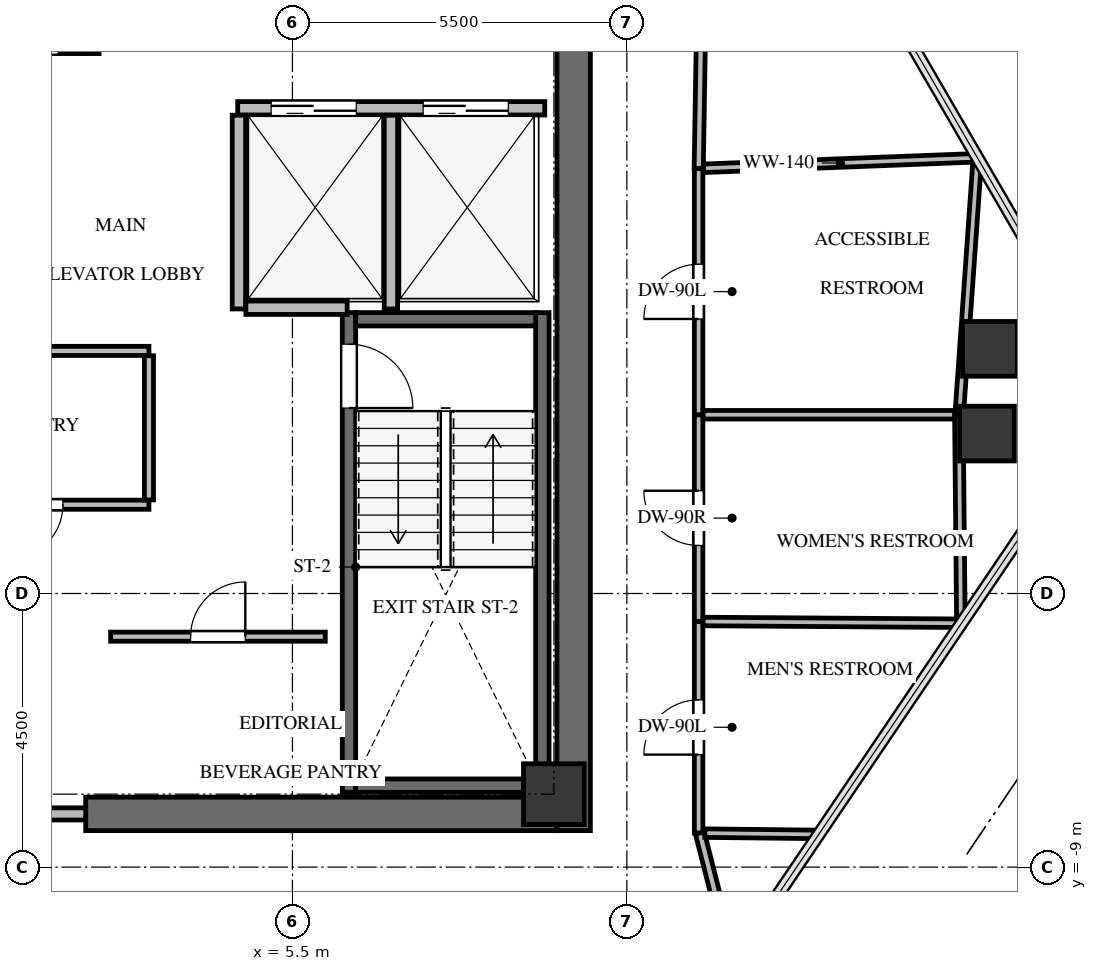
"""IFC4 building model, lengths in metres.
Left out: names, types, materials, properties, quantities, classifications, styles, units other than length and angle.
Written with IfcOpenShell. Run it as: python <this file> out.ifc"""

import sys

from ifc_helpers import new_model, si_unit, direction, frame, frame_2d, origin, origin_2d, place, context, subcontext, project, spatial, rectangle, extrude, source, transform, mapped, element, fill, save


model = new_model("IFC4")
c1 = context("Model", 3, precision=1e-05, world=origin(), true_north=direction((0.0, 1.0)))
c2 = subcontext(c1, "Body", "Model", "MODEL_VIEW")
j1 = project(units=[si_unit("LENGTHUNIT", "METRE"), si_unit("PLANEANGLEUNIT", "RADIAN")], contexts=[c1])
p1 = place(None, origin())
s1 = spatial("IfcSite", under=j1, at=p1, CompositionType="ELEMENT")
p2 = place(p1, origin())
s2 = spatial("IfcBuilding", under=s1, at=p2, CompositionType="ELEMENT")
p3 = place(p2, frame((0.0, 0.0, 254.7)))
s3 = spatial("IfcBuildingStorey", under=s2, at=p3, CompositionType="ELEMENT", Elevation=254.7)
p4 = place(p3, frame((10.125, -8.4, 0.0), z_axis=(0.0, 0.0, 1.0), x_axis=(0.0, 1.0, 0.0)))
e1 = element("IfcWall", 1, at=p4, inside=s3, PredefinedType="SHEAR", context=c2, shape_type="SweptSolid", body=[
    extrude(rectangle(XDim=16.8, YDim=0.55, at=frame_2d((8.4, 0.0))), origin(), (0.0, 0.0, 1.0), 3.4),
])
p5 = place(p3, frame((2.1, -8.125, 0.0), z_axis=(0.0, 0.0, 1.0), x_axis=(1.0, 0.0, 0.0)))
e2 = element("IfcWall", 2, at=p5, inside=s3, PredefinedType="SHEAR", context=c2, shape_type="SweptSolid", body=[
    extrude(rectangle(XDim=7.75, YDim=0.55, at=frame_2d((3.875, 0.0))), origin(), (0.0, 0.0, 1.0), 3.4),
])
p6 = place(p3, frame((9.61, -7.77, -0.24), z_axis=(0.0, 0.0, 1.0), x_axis=(0.0, 1.0, 0.0)))
e3 = element("IfcWall", 3, at=p6, inside=s3, PredefinedType="SHEAR", context=c2, shape_type="SweptSolid", body=[
    extrude(rectangle(XDim=7.89, YDim=0.22, at=frame_2d((3.945, 0.0))), origin(), (0.0, 0.0, 1.0), 3.4),
])
p7 = place(p3, frame((6.43, 0.12, -0.24), z_axis=(0.0, 0.0, 1.0), x_axis=(0.0, -1.0, 0.0)))
e4 = element("IfcWall", 4, at=p7, inside=s3, PredefinedType="SHEAR", context=c2, shape_type="SweptSolid", body=[
    extrude(rectangle(XDim=7.89, YDim=0.22, at=frame_2d((3.945, 0.0))), origin(), (0.0, 0.0, 1.0), 3.4),
])
p8 = place(p7, frame((0.52, 0.0, 0.0)))
e5 = element("IfcOpeningElement", 5, at=p8, cuts=e4, PredefinedType="OPENING", context=c2, shape_type="SweptSolid", body=[
    extrude(rectangle(XDim=1.05, YDim=2.15, at=frame_2d((0.525, 1.075))), frame((0.0, 0.12, 0.0), z_axis=(0.0, -1.0, 0.0), x_axis=(1.0, 0.0, 0.0)), (0.0, 0.0, 1.0), 0.24),
])
for number, where, z_axis, x_axis in (
    (6, (6.54, -7.66, -0.24), (0.0, 0.0, 1.0), (1.0, 0.0, 0.0)),
    (7, (9.5, 0.01, -0.24), (0.0, 0.0, 1.0), (-1.0, 0.0, 0.0)),
):
    element("IfcWall", number, at=place(p3, frame(where, z_axis=z_axis, x_axis=x_axis)), inside=s3, PredefinedType="SHEAR", context=c2, shape_type="SweptSolid", body=[
        extrude(rectangle(XDim=2.96, YDim=0.22, at=frame_2d((1.48, 0.0))), origin(), (0.0, 0.0, 1.0), 3.4),
    ])
p9 = place(p3, frame((2.21, 4.38, -0.24), z_axis=(0.0, 0.0, 1.0), x_axis=(0.0, 1.0, 0.0)))
e8 = element("IfcWall", 8, at=p9, inside=s3, PredefinedType="SHEAR", context=c2, shape_type="SweptSolid", body=[
    extrude(rectangle(XDim=3.4, YDim=0.22, at=frame_2d((1.7, 0.0))), origin(), (0.0, 0.0, 1.0), 3.4),
])
p10 = place(p3, frame((-5.25, 4.49, -0.24), z_axis=(0.0, 0.0, 1.0), x_axis=(1.0, 0.0, 0.0)))
e9 = element("IfcWall", 9, at=p10, inside=s3, PredefinedType="SHEAR", context=c2, shape_type="SweptSolid", body=[
    extrude(rectangle(XDim=7.35, YDim=0.22, at=frame_2d((3.675, 0.0))), origin(), (0.0, 0.0, 1.0), 3.4),
])
p11 = place(p10, frame((5.85, 0.0, 0.0)))
e10 = element("IfcOpeningElement", 10, at=p11, cuts=e9, PredefinedType="OPENING", context=c2, shape_type="SweptSolid", body=[
    extrude(rectangle(XDim=1.05, YDim=2.15, at=frame_2d((0.525, 1.075))), frame((0.0, 0.12, 0.0), z_axis=(0.0, -1.0, 0.0), x_axis=(1.0, 0.0, 0.0)), (0.0, 0.0, 1.0), 0.24),
])
m1 = source(origin(), c2, "Body", "SweptSolid", [
    extrude(rectangle(XDim=1.0, YDim=1.0, at=origin_2d()), origin(), (0.0, 0.0, 1.0), 3.4),
])
p12 = place(p3, frame((9.8, -7.8, -0.24), z_axis=(0.0, 0.0, 1.0), x_axis=(1.0, 0.0, 0.0)))
e11 = element("IfcColumn", 11, at=p12, inside=s3, PredefinedType="COLUMN", context=c2, shape_type="MappedRepresentation", body=[
    mapped(m1, transform((0.0, 0.0, 0.0), x_axis=(1.0, 0.0, 0.0), y_axis=(0.0, 1.0, 0.0), z_axis=(0.0, 0.0, 1.0), scale=1.0)),
])
m2 = source(origin(), c2, "Body", "SweptSolid", [
    extrude(rectangle(XDim=0.9, YDim=0.9, at=origin_2d()), origin(), (0.0, 0.0, 1.0), 3.4),
])
for number, where, z_axis, x_axis in (
    (12, (16.97, -0.476, -0.24), (0.0, 0.0, 1.0), (1.0, 0.0, 0.0)),
    (13, (16.922, -1.87, -0.24), (0.0, 0.0, 1.0), (1.0, 0.0, 0.0)),
):
    element("IfcColumn", number, at=place(p3, frame(where, z_axis=z_axis, x_axis=x_axis)), inside=s3, PredefinedType="COLUMN", context=c2, shape_type="MappedRepresentation", body=[
        mapped(m2, transform((0.0, 0.0, 0.0), x_axis=(1.0, 0.0, 0.0), y_axis=(0.0, 1.0, 0.0), z_axis=(0.0, 0.0, 1.0), scale=1.0)),
    ])
p13 = place(p3, frame((-2.1, -8.125, 0.0), z_axis=(0.0, 0.0, 1.0), x_axis=(1.0, 0.0, 0.0)))
e14 = element("IfcWall", 14, at=p13, inside=s3, PredefinedType="SOLIDWALL", context=c2, shape_type="SweptSolid", body=[
    extrude(rectangle(XDim=4.2, YDim=0.2, at=frame_2d((2.1, 0.0))), origin(), (0.0, 0.0, 1.0), 3.145),
])
p14 = place(p13, frame((1.2, 0.0, 0.0)))
e15 = element("IfcOpeningElement", 15, at=p14, cuts=e14, PredefinedType="OPENING", context=c2, shape_type="SweptSolid", body=[
    extrude(rectangle(XDim=1.8, YDim=2.15, at=frame_2d((0.9, 1.075))), frame((0.0, 0.11, 0.0), z_axis=(0.0, -1.0, 0.0), x_axis=(1.0, 0.0, 0.0)), (0.0, 0.0, 1.0), 0.22),
])
p15 = place(p3, frame((4.6, 3.48, 0.0), z_axis=(0.0, 0.0, 1.0), x_axis=(1.0, 0.0, 0.0)))
e16 = element("IfcWall", 16, at=p15, inside=s3, PredefinedType="SOLIDWALL", context=c2, shape_type="SweptSolid", body=[
    extrude(rectangle(XDim=5.05, YDim=0.22, at=frame_2d((2.525, 0.0))), origin(), (0.0, 0.0, 1.0), 3.145),
])
p16 = place(p15, frame((0.55, 0.0, 0.0)))
e17 = element("IfcOpeningElement", 17, at=p16, cuts=e16, PredefinedType="OPENING", context=c2, shape_type="SweptSolid", body=[
    extrude(rectangle(XDim=1.4, YDim=2.15, at=frame_2d((0.7, 1.075))), frame((0.0, 0.12, 0.0), z_axis=(0.0, -1.0, 0.0), x_axis=(1.0, 0.0, 0.0)), (0.0, 0.0, 1.0), 0.24),
])
p17 = place(p15, frame((3.05, 0.0, 0.0)))
e18 = element("IfcOpeningElement", 18, at=p17, cuts=e16, PredefinedType="OPENING", context=c2, shape_type="SweptSolid", body=[
    extrude(rectangle(XDim=1.4, YDim=2.15, at=frame_2d((0.7, 1.075))), frame((0.0, 0.12, 0.0), z_axis=(0.0, -1.0, 0.0), x_axis=(1.0, 0.0, 0.0)), (0.0, 0.0, 1.0), 0.24),
])
for number, where, z_axis, x_axis in (
    (19, (4.62, 0.18, 0.0), (0.0, 0.0, 1.0), (0.0, 1.0, 0.0)),
    (20, (7.12, 0.18, 0.0), (0.0, 0.0, 1.0), (0.0, 1.0, 0.0)),
):
    element("IfcWall", number, at=place(p3, frame(where, z_axis=z_axis, x_axis=x_axis)), inside=s3, PredefinedType="SOLIDWALL", context=c2, shape_type="SweptSolid", body=[
        extrude(rectangle(XDim=3.186, YDim=0.22, at=frame_2d((1.593, 0.0))), origin(), (0.0, 0.0, 1.0), 3.145),
    ])
p18 = place(p3, frame((4.734, 0.2, 0.0), z_axis=(0.0, 0.0, 1.0), x_axis=(1.0, 0.0, 0.0)))
e21 = element("IfcWall", 21, at=p18, inside=s3, PredefinedType="SOLIDWALL", context=c2, shape_type="SweptSolid", body=[
    extrude(rectangle(XDim=1.666, YDim=0.22, at=frame_2d((0.833, 0.0))), origin(), (0.0, 0.0, 1.0), 3.145),
])
p19 = place(p3, frame((2.51, -5.21, 0.0), z_axis=(0.0, 0.0, 1.0), x_axis=(1.0, 0.0, 0.0)))
e22 = element("IfcWall", 22, at=p19, inside=s3, PredefinedType="PARTITIONING", context=c2, shape_type="SweptSolid", body=[
    extrude(rectangle(XDim=3.53, YDim=0.15, at=frame_2d((1.765, 0.0))), origin(), (0.0, 0.0, 1.0), 3.145),
])
p20 = place(p19, frame((1.315, 0.0, 0.0)))
e23 = element("IfcOpeningElement", 23, at=p20, cuts=e22, PredefinedType="OPENING", context=c2, shape_type="SweptSolid", body=[
    extrude(rectangle(XDim=0.9, YDim=2.05, at=frame_2d((0.45, 1.025))), frame((0.0, 0.085, 0.0), z_axis=(0.0, -1.0, 0.0), x_axis=(1.0, 0.0, 0.0)), (0.0, 0.0, 1.0), 0.17),
])
p21 = place(p3, frame((3.14, -3.04, 0.0), z_axis=(0.0, 0.0, 1.0), x_axis=(-1.0, 0.0, 0.0)))
e24 = element("IfcWall", 24, at=p21, inside=s3, PredefinedType="PARTITIONING", context=c2, shape_type="SweptSolid", body=[
    extrude(rectangle(XDim=3.73, YDim=0.15, at=frame_2d((1.865, 0.0))), origin(), (0.0, 0.0, 1.0), 3.145),
])
p22 = place(p21, frame((1.415, 0.0, 0.0)))
e25 = element("IfcOpeningElement", 25, at=p22, cuts=e24, PredefinedType="OPENING", context=c2, shape_type="SweptSolid", body=[
    extrude(rectangle(XDim=0.9, YDim=2.05, at=frame_2d((0.45, 1.025))), frame((0.0, 0.085, 0.0), z_axis=(0.0, -1.0, 0.0), x_axis=(1.0, 0.0, 0.0)), (0.0, 0.0, 1.0), 0.17),
])
p23 = place(p3, frame((-0.59, -0.51, 0.0), z_axis=(0.0, 0.0, 1.0), x_axis=(1.0, 0.0, 0.0)))
e26 = element("IfcWall", 26, at=p23, inside=s3, PredefinedType="PARTITIONING", context=c2, shape_type="SweptSolid", body=[
    extrude(rectangle(XDim=3.73, YDim=0.15, at=frame_2d((1.865, 0.0))), origin(), (0.0, 0.0, 1.0), 3.145),
])
p24 = place(p3, frame((3.14, -0.589, 0.0), z_axis=(0.0, 0.0, 1.0), x_axis=(0.0, -1.0, 0.0)))
e27 = element("IfcWall", 27, at=p24, inside=s3, PredefinedType="PARTITIONING", context=c2, shape_type="SweptSolid", body=[
    extrude(rectangle(XDim=2.372, YDim=0.15, at=frame_2d((1.186, 0.0))), origin(), (0.0, 0.0, 1.0), 3.145),
])
p25 = place(p3, frame((12.18, -8.44, 0.0), z_axis=(0.0, 0.0, 1.0), x_axis=(0.0, 1.0, 0.0)))
e28 = element("IfcWall", 28, at=p25, inside=s3, PredefinedType="PARTITIONING", context=c2, shape_type="SweptSolid", body=[
    extrude(rectangle(XDim=3.48, YDim=0.14, at=frame_2d((1.74, 0.0))), origin(), (0.0, 0.0, 1.0), 2.499),
])
p26 = place(p25, frame((1.29, 0.0, 0.0)))
e29 = element("IfcOpeningElement", 29, at=p26, cuts=e28, PredefinedType="OPENING", context=c2, shape_type="SweptSolid", body=[
    extrude(rectangle(XDim=0.9, YDim=2.05, at=frame_2d((0.45, 1.025))), frame((0.0, 0.08, 0.0), z_axis=(0.0, -1.0, 0.0), x_axis=(1.0, 0.0, 0.0)), (0.0, 0.0, 1.0), 0.16),
])
p27 = place(p3, frame((12.18, -4.96, 0.0), z_axis=(0.0, 0.0, 1.0), x_axis=(0.0, 1.0, 0.0)))
e30 = element("IfcWall", 30, at=p27, inside=s3, PredefinedType="PARTITIONING", context=c2, shape_type="SweptSolid", body=[
    extrude(rectangle(XDim=3.4, YDim=0.14, at=frame_2d((1.7, 0.0))), origin(), (0.0, 0.0, 1.0), 3.145),
])
p28 = place(p27, frame((1.25, 0.0, 0.0)))
e31 = element("IfcOpeningElement", 31, at=p28, cuts=e30, PredefinedType="OPENING", context=c2, shape_type="SweptSolid", body=[
    extrude(rectangle(XDim=0.9, YDim=2.05, at=frame_2d((0.45, 1.025))), frame((0.0, 0.08, 0.0), z_axis=(0.0, -1.0, 0.0), x_axis=(1.0, 0.0, 0.0)), (0.0, 0.0, 1.0), 0.16),
])
p29 = place(p3, frame((12.18, -1.56, 0.0), z_axis=(0.0, 0.0, 1.0), x_axis=(0.0, 1.0, 0.0)))
e32 = element("IfcWall", 32, at=p29, inside=s3, PredefinedType="PARTITIONING", context=c2, shape_type="SweptSolid", body=[
    extrude(rectangle(XDim=4.05, YDim=0.14, at=frame_2d((2.025, 0.0))), origin(), (0.0, 0.0, 1.0), 2.401),
])
p30 = place(p29, frame((1.575, 0.0, 0.0)))
e33 = element("IfcOpeningElement", 33, at=p30, cuts=e32, PredefinedType="OPENING", context=c2, shape_type="SweptSolid", body=[
    extrude(rectangle(XDim=0.9, YDim=2.05, at=frame_2d((0.45, 1.025))), frame((0.0, 0.08, 0.0), z_axis=(0.0, -1.0, 0.0), x_axis=(1.0, 0.0, 0.0)), (0.0, 0.0, 1.0), 0.16),
])
p31 = place(p3, frame((12.719, -10.477, 0.0), z_axis=(0.0, 0.0, 1.0), x_axis=(-0.246550381988, 0.96912997536, 0.0)))
e34 = element("IfcWall", 34, at=p31, inside=s3, PredefinedType="PARTITIONING", context=c2, shape_type="SweptSolid", body=[
    extrude(rectangle(XDim=2.102, YDim=0.15, at=frame_2d((1.051, 0.0))), origin(), (0.0, 0.0, 1.0), 2.499),
])
p32 = place(p3, frame((12.181, 2.49, 0.0), z_axis=(0.0, 0.0, 1.0), x_axis=(0.016828669653, 0.999858387912, 0.0)))
e35 = element("IfcWall", 35, at=p32, inside=s3, PredefinedType="PARTITIONING", context=c2, shape_type="SweptSolid", body=[
    extrude(rectangle(XDim=7.674, YDim=0.15, at=frame_2d((3.837, 0.0))), origin(), (0.0, 0.0, 1.0), 2.499),
])
p33 = place(p32, frame((3.377, 0.0, 0.0)))
e36 = element("IfcOpeningElement", 36, at=p33, cuts=e35, PredefinedType="OPENING", context=c2, shape_type="SweptSolid", body=[
    extrude(rectangle(XDim=0.92, YDim=2.1, at=frame_2d((0.46, 1.05))), frame((0.0, 0.085, 0.0), z_axis=(0.0, -1.0, 0.0), x_axis=(1.0, 0.0, 0.0)), (0.0, 0.0, 1.0), 0.17),
])
p34 = place(p3, frame((12.254, -4.96, 0.0), z_axis=(0.0, 0.0, 1.0), x_axis=(0.999976630429, -0.006836563198, 0.0)))
e37 = element("IfcWall", 37, at=p34, inside=s3, PredefinedType="PARTITIONING", context=c2, shape_type="SweptSolid", body=[
    extrude(rectangle(XDim=4.25, YDim=0.14, at=frame_2d((2.125, 0.0))), origin(), (0.0, 0.0, 1.0), 2.499),
])
p35 = place(p3, frame((14.156, -8.462, 0.0), z_axis=(0.0, 0.0, 1.0), x_axis=(-0.999935742613, 0.011336253532, 0.0)))
e38 = element("IfcWall", 38, at=p35, inside=s3, PredefinedType="PARTITIONING", context=c2, shape_type="SweptSolid", body=[
    extrude(rectangle(XDim=1.874, YDim=0.14, at=frame_2d((0.937, 0.0))), origin(), (0.0, 0.0, 1.0), 2.499),
])
p36 = place(p3, frame((12.254, -1.56, 0.0), z_axis=(0.0, 0.0, 1.0), x_axis=(1.0, 0.0, 0.0)))
e39 = element("IfcWall", 39, at=p36, inside=s3, PredefinedType="PARTITIONING", context=c2, shape_type="SweptSolid", body=[
    extrude(rectangle(XDim=4.206, YDim=0.14, at=frame_2d((2.103, 0.0))), origin(), (0.0, 0.0, 1.0), 2.401),
])
p37 = place(p3, frame((16.46, -1.56, 0.0), z_axis=(0.0, 0.0, 1.0), x_axis=(0.009604446748, -0.999953876238, 0.0)))
e40 = element("IfcWall", 40, at=p37, inside=s3, PredefinedType="PARTITIONING", context=c2, shape_type="SweptSolid", body=[
    extrude(rectangle(XDim=3.355, YDim=0.14, at=frame_2d((1.678, 0.0))), origin(), (0.0, 0.0, 1.0), 2.401),
])
p38 = place(p3, frame((12.26, 2.493, 0.0), z_axis=(0.0, 0.0, 1.0), x_axis=(0.999256206289, 0.038562082324, 0.0)))
e41 = element("IfcWall", 41, at=p38, inside=s3, PredefinedType="PARTITIONING", context=c2, shape_type="SweptSolid", body=[
    extrude(rectangle(XDim=4.508, YDim=0.14, at=frame_2d((2.254, 0.0))), origin(), (0.0, 0.0, 1.0), 2.499),
])
p39 = place(p3, frame((16.76, 2.593, 0.0), z_axis=(0.0, 0.0, 1.0), x_axis=(-0.07055102187, -0.997508172053, 0.0)))
e42 = element("IfcWall", 42, at=p39, inside=s3, PredefinedType="PARTITIONING", context=c2, shape_type="SweptSolid", body=[
    extrude(rectangle(XDim=4.163, YDim=0.14, at=frame_2d((2.082, 0.0))), origin(), (0.0, 0.0, 1.0), 2.401),
])
m3 = source(origin(), c2, "Body", "SweptSolid", [
    extrude(rectangle(XDim=1.05, YDim=2.15, at=frame_2d((0.525, 1.075))), frame((0.0, 0.025, 0.0), z_axis=(0.0, -1.0, 0.0), x_axis=(1.0, 0.0, 0.0)), (0.0, 0.0, 1.0), 0.05),
])
p40 = place(p8, origin())
e43 = element("IfcDoor", 43, at=p40, inside=s3, OperationType="SINGLE_SWING_RIGHT", PredefinedType="DOOR", context=c2, shape_type="MappedRepresentation", body=[
    mapped(m3, transform((0.0, 0.0, 0.0), x_axis=(1.0, 0.0, 0.0), y_axis=(0.0, 1.0, 0.0), z_axis=(0.0, 0.0, 1.0), scale=1.0)),
])
fill(e5, e43)
m4 = source(origin(), c2, "Body", "SweptSolid", [
    extrude(rectangle(XDim=1.4, YDim=2.15, at=frame_2d((0.7, 1.075))), frame((0.0, 0.025, 0.0), z_axis=(0.0, -1.0, 0.0), x_axis=(1.0, 0.0, 0.0)), (0.0, 0.0, 1.0), 0.05),
])
p41 = place(p16, origin())
e44 = element("IfcDoor", 44, at=p41, inside=s3, OperationType="DOUBLE_DOOR_SLIDING", PredefinedType="DOOR", context=c2, shape_type="MappedRepresentation", body=[
    mapped(m4, transform((0.0, 0.0, 0.0), x_axis=(1.0, 0.0, 0.0), y_axis=(0.0, 1.0, 0.0), z_axis=(0.0, 0.0, 1.0), scale=1.0)),
])
fill(e17, e44)
p42 = place(p17, origin())
e45 = element("IfcDoor", 45, at=p42, inside=s3, OperationType="DOUBLE_DOOR_SLIDING", PredefinedType="DOOR", context=c2, shape_type="MappedRepresentation", body=[
    mapped(m4, transform((0.0, 0.0, 0.0), x_axis=(1.0, 0.0, 0.0), y_axis=(0.0, 1.0, 0.0), z_axis=(0.0, 0.0, 1.0), scale=1.0)),
])
fill(e18, e45)
m5 = source(origin(), c2, "Body", "SweptSolid", [
    extrude(rectangle(XDim=0.9, YDim=2.05, at=frame_2d((0.45, 1.025))), frame((0.0, 0.025, 0.0), z_axis=(0.0, -1.0, 0.0), x_axis=(1.0, 0.0, 0.0)), (0.0, 0.0, 1.0), 0.05),
])
p43 = place(p20, origin())
e46 = element("IfcDoor", 46, at=p43, inside=s3, OperationType="SINGLE_SWING_RIGHT", PredefinedType="DOOR", context=c2, shape_type="MappedRepresentation", body=[
    mapped(m5, transform((0.0, 0.0, 0.0), x_axis=(1.0, 0.0, 0.0), y_axis=(0.0, 1.0, 0.0), z_axis=(0.0, 0.0, 1.0), scale=1.0)),
])
fill(e23, e46)
p44 = place(p22, origin())
e47 = element("IfcDoor", 47, at=p44, inside=s3, OperationType="SINGLE_SWING_RIGHT", PredefinedType="DOOR", context=c2, shape_type="MappedRepresentation", body=[
    mapped(m5, transform((0.0, 0.0, 0.0), x_axis=(1.0, 0.0, 0.0), y_axis=(0.0, 1.0, 0.0), z_axis=(0.0, 0.0, 1.0), scale=1.0)),
])
fill(e25, e47)
m6 = source(origin(), c2, "Body", "SweptSolid", [
    extrude(rectangle(XDim=0.9, YDim=2.05, at=frame_2d((0.45, 1.025))), frame((0.0, 0.025, 0.0), z_axis=(0.0, -1.0, 0.0), x_axis=(1.0, 0.0, 0.0)), (0.0, 0.0, 1.0), 0.05),
])
p45 = place(p26, origin())
e48 = element("IfcDoor", 48, at=p45, inside=s3, OperationType="SINGLE_SWING_LEFT", PredefinedType="DOOR", context=c2, shape_type="MappedRepresentation", body=[
    mapped(m6, transform((0.0, 0.0, 0.0), x_axis=(1.0, 0.0, 0.0), y_axis=(0.0, 1.0, 0.0), z_axis=(0.0, 0.0, 1.0), scale=1.0)),
])
fill(e29, e48)
m7 = source(origin(), c2, "Body", "SweptSolid", [
    extrude(rectangle(XDim=0.9, YDim=2.05, at=frame_2d((0.45, 1.025))), frame((0.0, 0.025, 0.0), z_axis=(0.0, -1.0, 0.0), x_axis=(1.0, 0.0, 0.0)), (0.0, 0.0, 1.0), 0.05),
])
p46 = place(p28, origin())
e49 = element("IfcDoor", 49, at=p46, inside=s3, OperationType="SINGLE_SWING_RIGHT", PredefinedType="DOOR", context=c2, shape_type="MappedRepresentation", body=[
    mapped(m7, transform((0.0, 0.0, 0.0), x_axis=(1.0, 0.0, 0.0), y_axis=(0.0, 1.0, 0.0), z_axis=(0.0, 0.0, 1.0), scale=1.0)),
])
fill(e31, e49)
p47 = place(p30, origin())
e50 = element("IfcDoor", 50, at=p47, inside=s3, OperationType="SINGLE_SWING_LEFT", PredefinedType="DOOR", context=c2, shape_type="MappedRepresentation", body=[
    mapped(m6, transform((0.0, 0.0, 0.0), x_axis=(1.0, 0.0, 0.0), y_axis=(0.0, 1.0, 0.0), z_axis=(0.0, 0.0, 1.0), scale=1.0)),
])
fill(e33, e50)
save(model, sys.argv[1])
